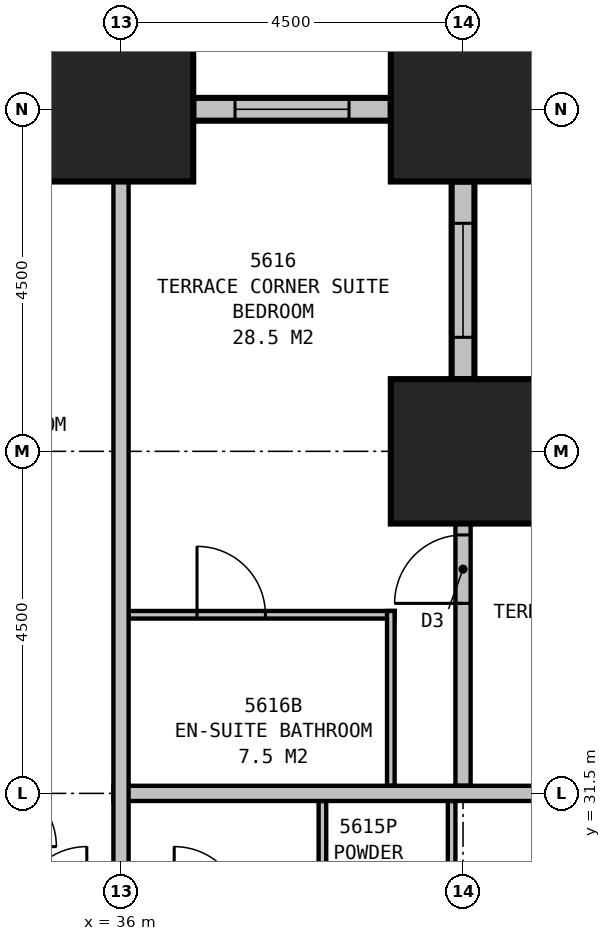
"""IFC4 building model, lengths in metres.
Left out: names, types, materials, properties, quantities, classifications, styles, units other than length and angle.
Written with IfcOpenShell. Run it as: python <this file> out.ifc"""

import sys

from ifc_helpers import new_model, si_unit, direction, frame, frame_2d, origin, origin_2d, place, context, subcontext, project, spatial, rectangle, extrude, element, fill, save


model = new_model("IFC4")
c1 = context("Model", 3, precision=1e-05, world=origin(), true_north=direction((0.0, 1.0)))
c2 = subcontext(c1, "Body", "Model", "MODEL_VIEW")
j1 = project(units=[si_unit("LENGTHUNIT", "METRE"), si_unit("PLANEANGLEUNIT", "RADIAN")], contexts=[c1])
p1 = place(None, origin())
s1 = spatial("IfcSite", under=j1, at=p1, CompositionType="ELEMENT")
p2 = place(p1, origin())
s2 = spatial("IfcBuilding", under=s1, at=p2, CompositionType="ELEMENT")
p3 = place(p2, frame((0.0, 0.0, 217.4)))
s3 = spatial("IfcBuildingStorey", under=s2, at=p3, CompositionType="ELEMENT", Elevation=217.4)
for number, where, z_axis, x_axis in (
    (1, (40.5, 36.0, 0.0), (0.0, 0.0, 1.0), (1.0, 0.0, 0.0)),
    (2, (40.5, 40.5, 0.0), (0.0, 0.0, 1.0), (1.0, 0.0, 0.0)),
    (3, (36.0, 40.5, 0.0), (0.0, 0.0, 1.0), (1.0, 0.0, 0.0)),
):
    element("IfcColumn", number, at=place(p3, frame(where, z_axis=z_axis, x_axis=x_axis)), inside=s3, PredefinedType="COLUMN", context=c2, shape_type="SweptSolid", body=[
        extrude(rectangle(XDim=1.9, YDim=1.9, at=origin_2d()), origin(), (0.0, 0.0, 1.0), 3.9),
    ])
p4 = place(p3, frame((40.5, 36.95, 0.0), z_axis=(0.0, 0.0, 1.0), x_axis=(0.0, 1.0, 0.0)))
e4 = element("IfcWall", 4, at=p4, inside=s3, PredefinedType="STANDARD", context=c2, shape_type="SweptSolid", body=[
    extrude(rectangle(XDim=2.6, YDim=0.3, at=frame_2d((1.3, 0.0))), origin(), (0.0, 0.0, 1.0), 2.15),
])
p5 = place(p4, frame((0.55, 0.0, 0.5)))
e5 = element("IfcOpeningElement", 5, at=p5, cuts=e4, PredefinedType="OPENING", context=c2, shape_type="SweptSolid", body=[
    extrude(rectangle(XDim=1.5, YDim=1.5, at=frame_2d((0.75, 0.75))), frame((0.0, 0.16, 0.0), z_axis=(0.0, -1.0, 0.0), x_axis=(1.0, 0.0, 0.0)), (0.0, 0.0, 1.0), 0.32),
])
p6 = place(p3, frame((39.55, 40.5, 0.0), z_axis=(0.0, 0.0, 1.0), x_axis=(-1.0, 0.0, 0.0)))
e6 = element("IfcWall", 6, at=p6, inside=s3, PredefinedType="STANDARD", context=c2, shape_type="SweptSolid", body=[
    extrude(rectangle(XDim=2.6, YDim=0.3, at=frame_2d((1.3, 0.0))), origin(), (0.0, 0.0, 1.0), 2.15),
])
p7 = place(p6, frame((0.55, 0.0, 0.5)))
e7 = element("IfcOpeningElement", 7, at=p7, cuts=e6, PredefinedType="OPENING", context=c2, shape_type="SweptSolid", body=[
    extrude(rectangle(XDim=1.5, YDim=1.5, at=frame_2d((0.75, 0.75))), frame((0.0, 0.16, 0.0), z_axis=(0.0, -1.0, 0.0), x_axis=(1.0, 0.0, 0.0)), (0.0, 0.0, 1.0), 0.32),
])
p8 = place(p3, frame((36.0, 29.9, 0.0), z_axis=(0.0, 0.0, 1.0), x_axis=(0.0, 1.0, 0.0)))
e8 = element("IfcWall", 8, at=p8, inside=s3, PredefinedType="PARTITIONING", context=c2, shape_type="SweptSolid", body=[
    extrude(rectangle(XDim=10.6, YDim=0.2, at=frame_2d((5.3, 0.0))), origin(), (0.0, 0.0, 1.0), 2.65),
])
p9 = place(p3, frame((35.9, 31.5, 0.0), z_axis=(0.0, 0.0, 1.0), x_axis=(1.0, 0.0, 0.0)))
e9 = element("IfcWall", 9, at=p9, inside=s3, PredefinedType="PARTITIONING", context=c2, shape_type="SweptSolid", body=[
    extrude(rectangle(XDim=10.099, YDim=0.2, at=frame_2d((5.05, 0.0))), origin(), (0.0, 0.0, 1.0), 3.65),
])
p10 = place(p9, frame((8.099, 0.0, 0.0)))
e10 = element("IfcOpeningElement", 10, at=p10, cuts=e9, PredefinedType="OPENING", context=c2, shape_type="SweptSolid", body=[
    extrude(rectangle(XDim=0.9, YDim=2.1, at=frame_2d((0.45, 1.05))), frame((0.0, 0.11, 0.0), z_axis=(0.0, -1.0, 0.0), x_axis=(1.0, 0.0, 0.0)), (0.0, 0.0, 1.0), 0.22),
])
p11 = place(p3, frame((40.35, 31.4, 0.0), z_axis=(0.0, 0.0, 1.0), x_axis=(0.0, -1.0, 0.0)))
e11 = element("IfcWall", 11, at=p11, inside=s3, PredefinedType="PLUMBINGWALL", context=c2, shape_type="SweptSolid", body=[
    extrude(rectangle(XDim=2.0, YDim=0.1, at=frame_2d((1.0, 0.0))), origin(), (0.0, 0.0, 1.0), 2.65),
])
p12 = place(p3, frame((38.65, 31.4, 0.0), z_axis=(0.0, 0.0, 1.0), x_axis=(0.0, -1.0, 0.0)))
e12 = element("IfcWall", 12, at=p12, inside=s3, PredefinedType="PLUMBINGWALL", context=c2, shape_type="SweptSolid", body=[
    extrude(rectangle(XDim=2.0, YDim=0.1, at=frame_2d((1.0, 0.0))), origin(), (0.0, 0.0, 1.0), 3.65),
])
p13 = place(p3, frame((40.5, 31.6, 0.0), z_axis=(0.0, 0.0, 1.0), x_axis=(0.0, 1.0, 0.0)))
e13 = element("IfcWall", 13, at=p13, inside=s3, PredefinedType="PARTITIONING", context=c2, shape_type="SweptSolid", body=[
    extrude(rectangle(XDim=4.4, YDim=0.2, at=frame_2d((2.2, 0.0))), origin(), (0.0, 0.0, 1.0), 2.65),
])
p14 = place(p13, frame((2.4, 0.0, 0.0)))
e14 = element("IfcOpeningElement", 14, at=p14, cuts=e13, PredefinedType="OPENING", context=c2, shape_type="SweptSolid", body=[
    extrude(rectangle(XDim=0.9, YDim=2.1, at=frame_2d((0.45, 1.05))), frame((0.0, 0.11, 0.0), z_axis=(0.0, -1.0, 0.0), x_axis=(1.0, 0.0, 0.0)), (0.0, 0.0, 1.0), 0.22),
])
p15 = place(p3, frame((39.55, 31.6, 0.0), z_axis=(0.0, 0.0, 1.0), x_axis=(0.0, 1.0, 0.0)))
e15 = element("IfcWall", 15, at=p15, inside=s3, PredefinedType="PLUMBINGWALL", context=c2, shape_type="SweptSolid", body=[
    extrude(rectangle(XDim=2.3, YDim=0.1, at=frame_2d((1.15, 0.0))), origin(), (0.0, 0.0, 1.0), 3.65),
])
p16 = place(p3, frame((36.1, 33.85, 0.0), z_axis=(0.0, 0.0, 1.0), x_axis=(1.0, 0.0, 0.0)))
e16 = element("IfcWall", 16, at=p16, inside=s3, PredefinedType="PLUMBINGWALL", context=c2, shape_type="SweptSolid", body=[
    extrude(rectangle(XDim=3.5, YDim=0.1, at=frame_2d((1.75, 0.0))), origin(), (0.0, 0.0, 1.0), 3.65),
])
p17 = place(p16, frame((0.9, 0.0, 0.0)))
e17 = element("IfcOpeningElement", 17, at=p17, cuts=e16, PredefinedType="OPENING", context=c2, shape_type="SweptSolid", body=[
    extrude(rectangle(XDim=0.9, YDim=2.1, at=frame_2d((0.45, 1.05))), frame((0.0, 0.06, 0.0), z_axis=(0.0, -1.0, 0.0), x_axis=(1.0, 0.0, 0.0)), (0.0, 0.0, 1.0), 0.12),
])
p18 = place(p5, origin())
e18 = element("IfcWindow", 18, at=p18, inside=s3, PartitioningType="SINGLE_PANEL", PredefinedType="WINDOW", context=c2, shape_type="SweptSolid", body=[
    extrude(rectangle(XDim=1.5, YDim=1.5, at=frame_2d((0.75, 0.75))), frame((0.0, 0.03, 0.0), z_axis=(0.0, -1.0, 0.0), x_axis=(1.0, 0.0, 0.0)), (0.0, 0.0, 1.0), 0.06),
])
fill(e5, e18)
p19 = place(p7, origin())
e19 = element("IfcWindow", 19, at=p19, inside=s3, PartitioningType="SINGLE_PANEL", PredefinedType="WINDOW", context=c2, shape_type="SweptSolid", body=[
    extrude(rectangle(XDim=1.5, YDim=1.5, at=frame_2d((0.75, 0.75))), frame((0.0, 0.03, 0.0), z_axis=(0.0, -1.0, 0.0), x_axis=(1.0, 0.0, 0.0)), (0.0, 0.0, 1.0), 0.06),
])
fill(e7, e19)
p20 = place(p14, origin())
e20 = element("IfcDoor", 20, at=p20, inside=s3, OperationType="SINGLE_SWING_LEFT", PredefinedType="DOOR", context=c2, shape_type="SweptSolid", body=[
    extrude(rectangle(XDim=0.9, YDim=2.1, at=frame_2d((0.45, 1.05))), frame((0.0, 0.025, 0.0), z_axis=(0.0, -1.0, 0.0), x_axis=(1.0, 0.0, 0.0)), (0.0, 0.0, 1.0), 0.05),
])
fill(e14, e20)
p21 = place(p17, origin())
e21 = element("IfcDoor", 21, at=p21, inside=s3, OperationType="SINGLE_SWING_LEFT", PredefinedType="DOOR", context=c2, shape_type="SweptSolid", body=[
    extrude(rectangle(XDim=0.9, YDim=2.1, at=frame_2d((0.45, 1.05))), frame((0.0, 0.025, 0.0), z_axis=(0.0, -1.0, 0.0), x_axis=(1.0, 0.0, 0.0)), (0.0, 0.0, 1.0), 0.05),
])
fill(e17, e21)
save(model, sys.argv[1])
